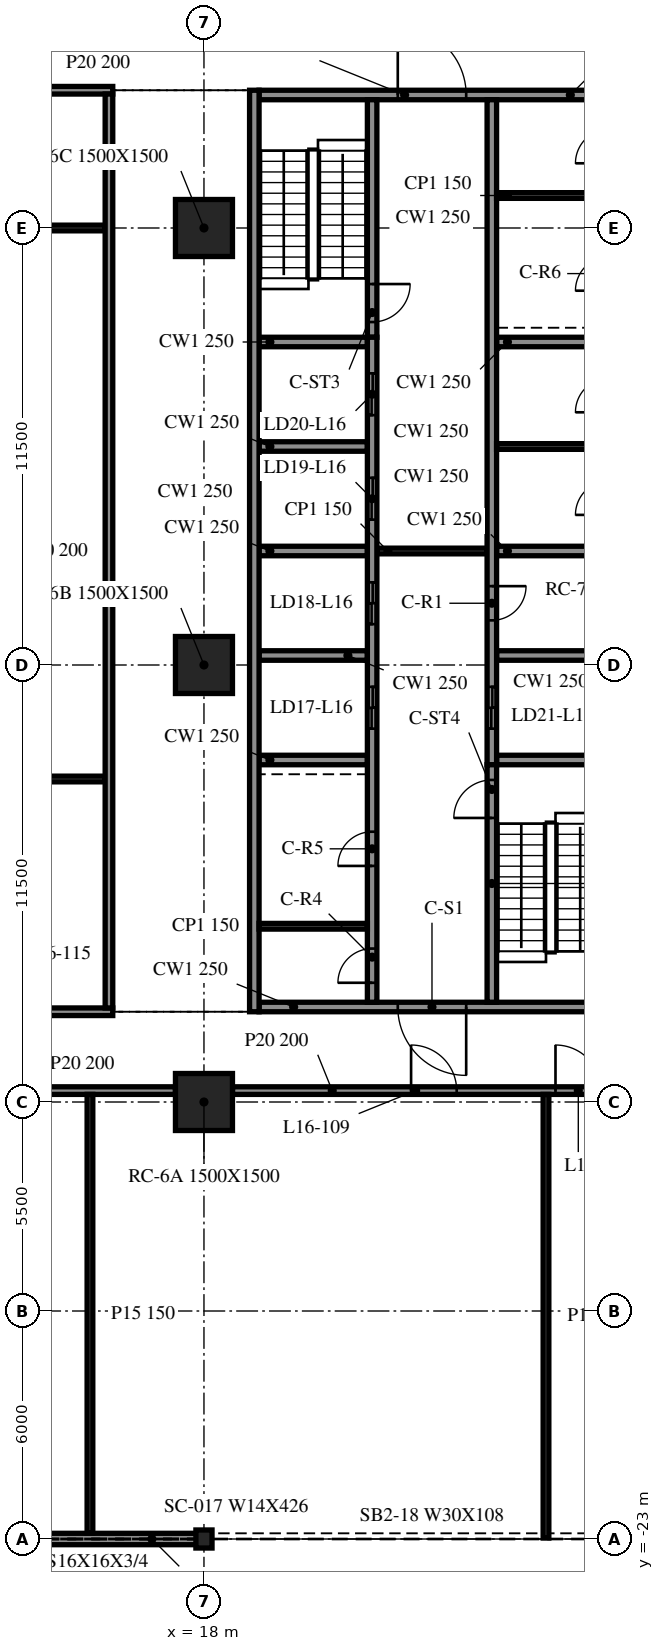
"""IFC4 building model, lengths in metres.
Left out: names, types, materials, properties, quantities, classifications, styles, units other than length and angle.
Written with IfcOpenShell. Run it as: python <this file> out.ifc"""

import sys

from ifc_helpers import new_model, si_unit, direction, frame, frame_2d, origin, origin_2d, place, context, subcontext, project, spatial, rectangle, i_section, extrude, element, fill, save


model = new_model("IFC4")
c1 = context("Model", 3, precision=1e-05, world=origin(), true_north=direction((0.0, 1.0)))
c2 = subcontext(c1, "Body", "Model", "MODEL_VIEW")
j1 = project(units=[si_unit("LENGTHUNIT", "METRE"), si_unit("PLANEANGLEUNIT", "RADIAN")], contexts=[c1])
p1 = place(None, origin())
s1 = spatial("IfcSite", under=j1, at=p1, CompositionType="ELEMENT")
p2 = place(p1, origin())
s2 = spatial("IfcBuilding", under=s1, at=p2, CompositionType="ELEMENT")
p3 = place(p2, frame((0.0, 0.0, 71.8)))
s3 = spatial("IfcBuildingStorey", under=s2, at=p3, CompositionType="ELEMENT", Elevation=71.8)
for number, where, z_axis, x_axis in (
    (1, (18.0, -11.5, -0.34), (0.0, 0.0, 1.0), (1.0, 0.0, 0.0)),
    (2, (18.0, 0.0, -0.34), (0.0, 0.0, 1.0), (1.0, 0.0, 0.0)),
    (3, (18.0, 11.5, -0.34), (0.0, 0.0, 1.0), (1.0, 0.0, 0.0)),
):
    element("IfcColumn", number, at=place(p3, frame(where, z_axis=z_axis, x_axis=x_axis)), inside=s3, PredefinedType="COLUMN", context=c2, shape_type="SweptSolid", body=[
        extrude(rectangle(XDim=1.5, YDim=1.5, at=origin_2d()), origin(), (0.0, 0.0, 1.0), 4.3),
    ])
p4 = place(p3, frame((18.0, -23.0, -0.34), z_axis=(0.0, 0.0, 1.0), x_axis=(1.0, 0.0, 0.0)))
e4 = element("IfcColumn", 4, at=p4, inside=s3, PredefinedType="COLUMN", context=c2, shape_type="SweptSolid", body=[
    extrude(i_section(OverallWidth=0.424, OverallDepth=0.475, WebThickness=0.048, FlangeThickness=0.077, at=origin_2d()), origin(), (0.0, 0.0, 1.0), 4.3),
])
p5 = place(p3, frame((6.024, -23.0, 0.0), z_axis=(0.0, 0.0, 1.0), x_axis=(1.0, 0.0, 0.0)))
e5 = element("IfcWall", 5, at=p5, inside=s3, PredefinedType="NOTDEFINED", context=c2, shape_type="SweptSolid", body=[
    extrude(rectangle(XDim=11.952, YDim=0.3, at=frame_2d((5.976, 0.0))), origin(), (0.0, 0.0, 1.0), 3.203),
])
p6 = place(p3, frame((19.325, 15.125, 0.0), z_axis=(0.0, 0.0, 1.0), x_axis=(0.0, -1.0, 0.0)))
e6 = element("IfcWall", 6, at=p6, inside=s3, PredefinedType="SOLIDWALL", context=c2, shape_type="SweptSolid", body=[
    extrude(rectangle(XDim=24.25, YDim=0.25, at=frame_2d((12.125, 0.0))), origin(), (0.0, 0.0, 1.0), 3.96),
])
p7 = place(p3, frame((28.55, -9.0, 0.0), z_axis=(0.0, 0.0, 1.0), x_axis=(-1.0, 0.0, 0.0)))
e7 = element("IfcWall", 7, at=p7, inside=s3, PredefinedType="SOLIDWALL", context=c2, shape_type="SweptSolid", body=[
    extrude(rectangle(XDim=9.1, YDim=0.25, at=frame_2d((4.55, 0.0))), origin(), (0.0, 0.0, 1.0), 3.96),
])
p8 = place(p7, frame((3.65, 0.0, 0.0)))
e8 = element("IfcOpeningElement", 8, at=p8, cuts=e7, PredefinedType="OPENING", context=c2, shape_type="SweptSolid", body=[
    extrude(rectangle(XDim=1.8, YDim=2.1, at=frame_2d((0.9, 1.05))), frame((0.0, 0.135, 0.0), z_axis=(0.0, -1.0, 0.0), x_axis=(1.0, 0.0, 0.0)), (0.0, 0.0, 1.0), 0.27),
])
p9 = place(p3, frame((19.45, 15.0, 0.0), z_axis=(0.0, 0.0, 1.0), x_axis=(1.0, 0.0, 0.0)))
e9 = element("IfcWall", 9, at=p9, inside=s3, PredefinedType="SOLIDWALL", context=c2, shape_type="SweptSolid", body=[
    extrude(rectangle(XDim=9.1, YDim=0.25, at=frame_2d((4.55, 0.0))), origin(), (0.0, 0.0, 1.0), 3.96),
])
p10 = place(p9, frame((3.65, 0.0, 0.0)))
e10 = element("IfcOpeningElement", 10, at=p10, cuts=e9, PredefinedType="OPENING", context=c2, shape_type="SweptSolid", body=[
    extrude(rectangle(XDim=1.8, YDim=2.1, at=frame_2d((0.9, 1.05))), frame((0.0, 0.135, 0.0), z_axis=(0.0, -1.0, 0.0), x_axis=(1.0, 0.0, 0.0)), (0.0, 0.0, 1.0), 0.27),
])
p11 = place(p3, frame((22.425, -8.875, 0.0), z_axis=(0.0, 0.0, 1.0), x_axis=(0.0, 1.0, 0.0)))
e11 = element("IfcWall", 11, at=p11, inside=s3, PredefinedType="SOLIDWALL", context=c2, shape_type="SweptSolid", body=[
    extrude(rectangle(XDim=17.5, YDim=0.25, at=frame_2d((8.75, 0.0))), origin(), (0.0, 0.0, 1.0), 3.96),
])
p12 = place(p11, frame((7.2, 0.0, 0.0)))
e12 = element("IfcOpeningElement", 12, at=p12, cuts=e11, PredefinedType="OPENING", context=c2, shape_type="SweptSolid", body=[
    extrude(rectangle(XDim=1.1, YDim=2.1, at=frame_2d((0.55, 1.05))), frame((0.0, 0.135, 0.0), z_axis=(0.0, -1.0, 0.0), x_axis=(1.0, 0.0, 0.0)), (0.0, 0.0, 1.0), 0.27),
])
p13 = place(p11, frame((9.95, 0.0, 0.0)))
e13 = element("IfcOpeningElement", 13, at=p13, cuts=e11, PredefinedType="OPENING", context=c2, shape_type="SweptSolid", body=[
    extrude(rectangle(XDim=1.1, YDim=2.1, at=frame_2d((0.55, 1.05))), frame((0.0, 0.135, 0.0), z_axis=(0.0, -1.0, 0.0), x_axis=(1.0, 0.0, 0.0)), (0.0, 0.0, 1.0), 0.27),
])
p14 = place(p11, frame((12.7, 0.0, 0.0)))
e14 = element("IfcOpeningElement", 14, at=p14, cuts=e11, PredefinedType="OPENING", context=c2, shape_type="SweptSolid", body=[
    extrude(rectangle(XDim=1.1, YDim=2.1, at=frame_2d((0.55, 1.05))), frame((0.0, 0.135, 0.0), z_axis=(0.0, -1.0, 0.0), x_axis=(1.0, 0.0, 0.0)), (0.0, 0.0, 1.0), 0.27),
])
p15 = place(p11, frame((15.45, 0.0, 0.0)))
e15 = element("IfcOpeningElement", 15, at=p15, cuts=e11, PredefinedType="OPENING", context=c2, shape_type="SweptSolid", body=[
    extrude(rectangle(XDim=1.1, YDim=2.1, at=frame_2d((0.55, 1.05))), frame((0.0, 0.135, 0.0), z_axis=(0.0, -1.0, 0.0), x_axis=(1.0, 0.0, 0.0)), (0.0, 0.0, 1.0), 0.27),
])
p16 = place(p11, frame((0.512, 0.0, 0.0)))
e16 = element("IfcOpeningElement", 16, at=p16, cuts=e11, PredefinedType="OPENING", context=c2, shape_type="SweptSolid", body=[
    extrude(rectangle(XDim=0.9, YDim=2.1, at=frame_2d((0.45, 1.05))), frame((0.0, 0.135, 0.0), z_axis=(0.0, -1.0, 0.0), x_axis=(1.0, 0.0, 0.0)), (0.0, 0.0, 1.0), 0.27),
])
p17 = place(p11, frame((3.587, 0.0, 0.0)))
e17 = element("IfcOpeningElement", 17, at=p17, cuts=e11, PredefinedType="OPENING", context=c2, shape_type="SweptSolid", body=[
    extrude(rectangle(XDim=0.9, YDim=2.1, at=frame_2d((0.45, 1.05))), frame((0.0, 0.135, 0.0), z_axis=(0.0, -1.0, 0.0), x_axis=(1.0, 0.0, 0.0)), (0.0, 0.0, 1.0), 0.27),
])
p18 = place(p3, frame((22.425, 14.875, 0.0), z_axis=(0.0, 0.0, 1.0), x_axis=(0.0, -1.0, 0.0)))
e18 = element("IfcWall", 18, at=p18, inside=s3, PredefinedType="SOLIDWALL", context=c2, shape_type="SweptSolid", body=[
    extrude(rectangle(XDim=6.25, YDim=0.25, at=frame_2d((3.125, 0.0))), origin(), (0.0, 0.0, 1.0), 3.96),
])
p19 = place(p18, frame((4.85, 0.0, 0.0)))
e19 = element("IfcOpeningElement", 19, at=p19, cuts=e18, PredefinedType="OPENING", context=c2, shape_type="SweptSolid", body=[
    extrude(rectangle(XDim=1.0, YDim=2.1, at=frame_2d((0.5, 1.05))), frame((0.0, 0.135, 0.0), z_axis=(0.0, -1.0, 0.0), x_axis=(1.0, 0.0, 0.0)), (0.0, 0.0, 1.0), 0.27),
])
p20 = place(p3, frame((25.575, -8.875, 0.0), z_axis=(0.0, 0.0, 1.0), x_axis=(0.0, 1.0, 0.0)))
e20 = element("IfcWall", 20, at=p20, inside=s3, PredefinedType="SOLIDWALL", context=c2, shape_type="SweptSolid", body=[
    extrude(rectangle(XDim=6.25, YDim=0.25, at=frame_2d((3.125, 0.0))), origin(), (0.0, 0.0, 1.0), 3.96),
])
p21 = place(p20, frame((4.85, 0.0, 0.0)))
e21 = element("IfcOpeningElement", 21, at=p21, cuts=e20, PredefinedType="OPENING", context=c2, shape_type="SweptSolid", body=[
    extrude(rectangle(XDim=1.0, YDim=2.1, at=frame_2d((0.5, 1.05))), frame((0.0, 0.135, 0.0), z_axis=(0.0, -1.0, 0.0), x_axis=(1.0, 0.0, 0.0)), (0.0, 0.0, 1.0), 0.27),
])
p22 = place(p3, frame((25.575, 14.875, 0.0), z_axis=(0.0, 0.0, 1.0), x_axis=(0.0, -1.0, 0.0)))
e22 = element("IfcWall", 22, at=p22, inside=s3, PredefinedType="SOLIDWALL", context=c2, shape_type="SweptSolid", body=[
    extrude(rectangle(XDim=17.5, YDim=0.25, at=frame_2d((8.75, 0.0))), origin(), (0.0, 0.0, 1.0), 3.96),
])
p23 = place(p22, frame((15.45, 0.0, 0.0)))
e23 = element("IfcOpeningElement", 23, at=p23, cuts=e22, PredefinedType="OPENING", context=c2, shape_type="SweptSolid", body=[
    extrude(rectangle(XDim=1.1, YDim=2.1, at=frame_2d((0.55, 1.05))), frame((0.0, 0.135, 0.0), z_axis=(0.0, -1.0, 0.0), x_axis=(1.0, 0.0, 0.0)), (0.0, 0.0, 1.0), 0.27),
])
p24 = place(p22, frame((12.8, 0.0, 0.0)))
e24 = element("IfcOpeningElement", 24, at=p24, cuts=e22, PredefinedType="OPENING", context=c2, shape_type="SweptSolid", body=[
    extrude(rectangle(XDim=0.9, YDim=2.1, at=frame_2d((0.45, 1.05))), frame((0.0, 0.135, 0.0), z_axis=(0.0, -1.0, 0.0), x_axis=(1.0, 0.0, 0.0)), (0.0, 0.0, 1.0), 0.27),
])
for number, where, z_axis, x_axis in (
    (25, (19.45, -2.5, 0.0), (0.0, 0.0, 1.0), (1.0, 0.0, 0.0)),
    (26, (19.45, 0.25, 0.0), (0.0, 0.0, 1.0), (1.0, 0.0, 0.0)),
    (27, (19.45, 3.0, 0.0), (0.0, 0.0, 1.0), (1.0, 0.0, 0.0)),
    (28, (19.45, 5.75, 0.0), (0.0, 0.0, 1.0), (1.0, 0.0, 0.0)),
    (29, (19.45, 8.5, 0.0), (0.0, 0.0, 1.0), (1.0, 0.0, 0.0)),
    (30, (25.7, -2.5, 0.0), (0.0, 0.0, 1.0), (1.0, 0.0, 0.0)),
    (31, (25.7, 0.25, 0.0), (0.0, 0.0, 1.0), (1.0, 0.0, 0.0)),
    (32, (25.7, 3.0, 0.0), (0.0, 0.0, 1.0), (1.0, 0.0, 0.0)),
    (33, (25.7, 8.5, 0.0), (0.0, 0.0, 1.0), (1.0, 0.0, 0.0)),
):
    element("IfcWall", number, at=place(p3, frame(where, z_axis=z_axis, x_axis=x_axis)), inside=s3, PredefinedType="SOLIDWALL", context=c2, shape_type="SweptSolid", body=[
        extrude(rectangle(XDim=2.85, YDim=0.25, at=frame_2d((1.425, 0.0))), origin(), (0.0, 0.0, 1.0), 3.96),
    ])
p25 = place(p3, frame((22.55, 3.0, 0.0), z_axis=(0.0, 0.0, 1.0), x_axis=(1.0, 0.0, 0.0)))
e34 = element("IfcWall", 34, at=p25, inside=s3, PredefinedType="PARTITIONING", context=c2, shape_type="SweptSolid", body=[
    extrude(rectangle(XDim=2.9, YDim=0.15, at=frame_2d((1.45, 0.0))), origin(), (0.0, 0.0, 1.0), 3.96),
])
for number, where, z_axis, x_axis in (
    (35, (25.7, 5.75, 0.0), (0.0, 0.0, 1.0), (1.0, 0.0, 0.0)),
    (36, (19.45, -6.875, 0.0), (0.0, 0.0, 1.0), (1.0, 0.0, 0.0)),
    (37, (25.7, 12.355, 0.0), (0.0, 0.0, 1.0), (1.0, 0.0, 0.0)),
):
    element("IfcWall", number, at=place(p3, frame(where, z_axis=z_axis, x_axis=x_axis)), inside=s3, PredefinedType="PARTITIONING", context=c2, shape_type="SweptSolid", body=[
        extrude(rectangle(XDim=2.85, YDim=0.15, at=frame_2d((1.425, 0.0))), origin(), (0.0, 0.0, 1.0), 3.96),
    ])
p26 = place(p3, frame((6.75, -11.2, 0.0), z_axis=(0.0, 0.0, 1.0), x_axis=(1.0, 0.0, 0.0)))
e38 = element("IfcWall", 38, at=p26, inside=s3, PredefinedType="PARTITIONING", context=c2, shape_type="SweptSolid", body=[
    extrude(rectangle(XDim=10.5, YDim=0.2, at=frame_2d((5.25, 0.0))), origin(), (0.0, 0.0, 1.0), 3.96),
])
p27 = place(p26, frame((4.7, 0.0, 0.0)))
e39 = element("IfcOpeningElement", 39, at=p27, cuts=e38, PredefinedType="OPENING", context=c2, shape_type="SweptSolid", body=[
    extrude(rectangle(XDim=1.0, YDim=2.1, at=frame_2d((0.5, 1.05))), frame((0.0, 0.11, 0.0), z_axis=(0.0, -1.0, 0.0), x_axis=(1.0, 0.0, 0.0)), (0.0, 0.0, 1.0), 0.22),
])
p28 = place(p3, frame((18.75, -11.2, 0.0), z_axis=(0.0, 0.0, 1.0), x_axis=(1.0, 0.0, 0.0)))
e40 = element("IfcWall", 40, at=p28, inside=s3, PredefinedType="PARTITIONING", context=c2, shape_type="SweptSolid", body=[
    extrude(rectangle(XDim=10.5, YDim=0.2, at=frame_2d((5.25, 0.0))), origin(), (0.0, 0.0, 1.0), 3.96),
])
p29 = place(p28, frame((4.7, 0.0, 0.0)))
e41 = element("IfcOpeningElement", 41, at=p29, cuts=e40, PredefinedType="OPENING", context=c2, shape_type="SweptSolid", body=[
    extrude(rectangle(XDim=1.2, YDim=2.1, at=frame_2d((0.6, 1.05))), frame((0.0, 0.11, 0.0), z_axis=(0.0, -1.0, 0.0), x_axis=(1.0, 0.0, 0.0)), (0.0, 0.0, 1.0), 0.22),
])
p30 = place(p28, frame((8.5, 0.0, 0.0)))
e42 = element("IfcOpeningElement", 42, at=p30, cuts=e40, PredefinedType="OPENING", context=c2, shape_type="SweptSolid", body=[
    extrude(rectangle(XDim=1.2, YDim=2.1, at=frame_2d((0.6, 1.05))), frame((0.0, 0.11, 0.0), z_axis=(0.0, -1.0, 0.0), x_axis=(1.0, 0.0, 0.0)), (0.0, 0.0, 1.0), 0.22),
])
p31 = place(p3, frame((8.3, -9.125, 0.0), z_axis=(0.0, 0.0, 1.0), x_axis=(1.0, 0.0, 0.0)))
e43 = element("IfcWall", 43, at=p31, inside=s3, PredefinedType="PARTITIONING", context=c2, shape_type="SweptSolid", body=[
    extrude(rectangle(XDim=7.3, YDim=0.2, at=frame_2d((3.65, 0.0))), origin(), (0.0, 0.0, 1.0), 3.96),
])
p32 = place(p31, frame((3.1, 0.0, 0.0)))
e44 = element("IfcOpeningElement", 44, at=p32, cuts=e43, PredefinedType="OPENING", context=c2, shape_type="SweptSolid", body=[
    extrude(rectangle(XDim=1.0, YDim=2.1, at=frame_2d((0.5, 1.05))), frame((0.0, 0.11, 0.0), z_axis=(0.0, -1.0, 0.0), x_axis=(1.0, 0.0, 0.0)), (0.0, 0.0, 1.0), 0.22),
])
for number, where, z_axis, x_axis in (
    (45, (8.5, -3.0, 0.0), (0.0, 0.0, 1.0), (1.0, 0.0, 0.0)),
    (46, (8.5, 11.5, 0.0), (0.0, 0.0, 1.0), (1.0, 0.0, 0.0)),
):
    element("IfcWall", number, at=place(p3, frame(where, z_axis=z_axis, x_axis=x_axis)), inside=s3, PredefinedType="PARTITIONING", context=c2, shape_type="SweptSolid", body=[
        extrude(rectangle(XDim=6.9, YDim=0.15, at=frame_2d((3.45, 0.0))), origin(), (0.0, 0.0, 1.0), 3.96),
    ])
p33 = place(p3, frame((8.3, 15.125, 0.0), z_axis=(0.0, 0.0, 1.0), x_axis=(1.0, 0.0, 0.0)))
e47 = element("IfcWall", 47, at=p33, inside=s3, PredefinedType="PARTITIONING", context=c2, shape_type="SweptSolid", body=[
    extrude(rectangle(XDim=7.3, YDim=0.2, at=frame_2d((3.65, 0.0))), origin(), (0.0, 0.0, 1.0), 3.96),
])
p34 = place(p33, frame((3.1, 0.0, 0.0)))
e48 = element("IfcOpeningElement", 48, at=p34, cuts=e47, PredefinedType="OPENING", context=c2, shape_type="SweptSolid", body=[
    extrude(rectangle(XDim=1.0, YDim=2.1, at=frame_2d((0.5, 1.05))), frame((0.0, 0.11, 0.0), z_axis=(0.0, -1.0, 0.0), x_axis=(1.0, 0.0, 0.0)), (0.0, 0.0, 1.0), 0.22),
])
p35 = place(p3, frame((15.0, -22.85, 0.0), z_axis=(0.0, 0.0, 1.0), x_axis=(0.0, 1.0, 0.0)))
e49 = element("IfcWall", 49, at=p35, inside=s3, PredefinedType="PARTITIONING", context=c2, shape_type="SweptSolid", body=[
    extrude(rectangle(XDim=11.55, YDim=0.15, at=frame_2d((5.775, 0.0))), origin(), (0.0, 0.0, 1.0), 3.96),
])
p36 = place(p3, frame((15.5, -9.025, 0.0), z_axis=(0.0, 0.0, 1.0), x_axis=(0.0, 1.0, 0.0)))
e50 = element("IfcWall", 50, at=p36, inside=s3, PredefinedType="PARTITIONING", context=c2, shape_type="SweptSolid", body=[
    extrude(rectangle(XDim=24.05, YDim=0.2, at=frame_2d((12.025, 0.0))), origin(), (0.0, 0.0, 1.0), 3.96),
])
p37 = place(p3, frame((27.0, -22.975, 0.0), z_axis=(0.0, 0.0, 1.0), x_axis=(0.0, 1.0, 0.0)))
e51 = element("IfcWall", 51, at=p37, inside=s3, PredefinedType="PARTITIONING", context=c2, shape_type="SweptSolid", body=[
    extrude(rectangle(XDim=11.675, YDim=0.15, at=frame_2d((5.837, 0.0))), origin(), (0.0, 0.0, 1.0), 3.96),
])
p38 = place(p8, origin())
e52 = element("IfcDoor", 52, at=p38, inside=s3, OperationType="DOUBLE_DOOR_SINGLE_SWING", PredefinedType="DOOR", context=c2, shape_type="SweptSolid", body=[
    extrude(rectangle(XDim=1.8, YDim=2.1, at=frame_2d((0.9, 1.05))), frame((0.0, 0.025, 0.0), z_axis=(0.0, -1.0, 0.0), x_axis=(1.0, 0.0, 0.0)), (0.0, 0.0, 1.0), 0.05),
])
fill(e8, e52)
p39 = place(p10, origin())
e53 = element("IfcDoor", 53, at=p39, inside=s3, OperationType="DOUBLE_DOOR_SINGLE_SWING", PredefinedType="DOOR", context=c2, shape_type="SweptSolid", body=[
    extrude(rectangle(XDim=1.8, YDim=2.1, at=frame_2d((0.9, 1.05))), frame((0.0, 0.025, 0.0), z_axis=(0.0, -1.0, 0.0), x_axis=(1.0, 0.0, 0.0)), (0.0, 0.0, 1.0), 0.05),
])
fill(e10, e53)
p40 = place(p23, origin())
e54 = element("IfcDoor", 54, at=p40, inside=s3, OperationType="DOUBLE_DOOR_SLIDING", PredefinedType="DOOR", context=c2, shape_type="SweptSolid", body=[
    extrude(rectangle(XDim=1.1, YDim=2.1, at=frame_2d((0.55, 1.05))), frame((0.0, 0.025, 0.0), z_axis=(0.0, -1.0, 0.0), x_axis=(1.0, 0.0, 0.0)), (0.0, 0.0, 1.0), 0.05),
])
fill(e23, e54)
p41 = place(p12, origin())
e55 = element("IfcDoor", 55, at=p41, inside=s3, OperationType="DOUBLE_DOOR_SLIDING", PredefinedType="DOOR", context=c2, shape_type="SweptSolid", body=[
    extrude(rectangle(XDim=1.1, YDim=2.1, at=frame_2d((0.55, 1.05))), frame((0.0, 0.025, 0.0), z_axis=(0.0, -1.0, 0.0), x_axis=(1.0, 0.0, 0.0)), (0.0, 0.0, 1.0), 0.05),
])
fill(e12, e55)
p42 = place(p13, origin())
e56 = element("IfcDoor", 56, at=p42, inside=s3, OperationType="DOUBLE_DOOR_SLIDING", PredefinedType="DOOR", context=c2, shape_type="SweptSolid", body=[
    extrude(rectangle(XDim=1.1, YDim=2.1, at=frame_2d((0.55, 1.05))), frame((0.0, 0.025, 0.0), z_axis=(0.0, -1.0, 0.0), x_axis=(1.0, 0.0, 0.0)), (0.0, 0.0, 1.0), 0.05),
])
fill(e13, e56)
p43 = place(p14, origin())
e57 = element("IfcDoor", 57, at=p43, inside=s3, OperationType="DOUBLE_DOOR_SLIDING", PredefinedType="DOOR", context=c2, shape_type="SweptSolid", body=[
    extrude(rectangle(XDim=1.1, YDim=2.1, at=frame_2d((0.55, 1.05))), frame((0.0, 0.025, 0.0), z_axis=(0.0, -1.0, 0.0), x_axis=(1.0, 0.0, 0.0)), (0.0, 0.0, 1.0), 0.05),
])
fill(e14, e57)
p44 = place(p15, origin())
e58 = element("IfcDoor", 58, at=p44, inside=s3, OperationType="DOUBLE_DOOR_SLIDING", PredefinedType="DOOR", context=c2, shape_type="SweptSolid", body=[
    extrude(rectangle(XDim=1.1, YDim=2.1, at=frame_2d((0.55, 1.05))), frame((0.0, 0.025, 0.0), z_axis=(0.0, -1.0, 0.0), x_axis=(1.0, 0.0, 0.0)), (0.0, 0.0, 1.0), 0.05),
])
fill(e15, e58)
p45 = place(p24, origin())
e59 = element("IfcDoor", 59, at=p45, inside=s3, OperationType="SINGLE_SWING_LEFT", PredefinedType="DOOR", context=c2, shape_type="SweptSolid", body=[
    extrude(rectangle(XDim=0.9, YDim=2.1, at=frame_2d((0.45, 1.05))), frame((0.0, 0.025, 0.0), z_axis=(0.0, -1.0, 0.0), x_axis=(1.0, 0.0, 0.0)), (0.0, 0.0, 1.0), 0.05),
])
fill(e24, e59)
p46 = place(p16, origin())
e60 = element("IfcDoor", 60, at=p46, inside=s3, OperationType="SINGLE_SWING_RIGHT", PredefinedType="DOOR", context=c2, shape_type="SweptSolid", body=[
    extrude(rectangle(XDim=0.9, YDim=2.1, at=frame_2d((0.45, 1.05))), frame((0.0, 0.025, 0.0), z_axis=(0.0, -1.0, 0.0), x_axis=(1.0, 0.0, 0.0)), (0.0, 0.0, 1.0), 0.05),
])
fill(e16, e60)
p47 = place(p17, origin())
e61 = element("IfcDoor", 61, at=p47, inside=s3, OperationType="SINGLE_SWING_LEFT", PredefinedType="DOOR", context=c2, shape_type="SweptSolid", body=[
    extrude(rectangle(XDim=0.9, YDim=2.1, at=frame_2d((0.45, 1.05))), frame((0.0, 0.025, 0.0), z_axis=(0.0, -1.0, 0.0), x_axis=(1.0, 0.0, 0.0)), (0.0, 0.0, 1.0), 0.05),
])
fill(e17, e61)
p48 = place(p19, origin())
e62 = element("IfcDoor", 62, at=p48, inside=s3, OperationType="SINGLE_SWING_RIGHT", PredefinedType="DOOR", context=c2, shape_type="SweptSolid", body=[
    extrude(rectangle(XDim=1.0, YDim=2.1, at=frame_2d((0.5, 1.05))), frame((0.0, 0.025, 0.0), z_axis=(0.0, -1.0, 0.0), x_axis=(1.0, 0.0, 0.0)), (0.0, 0.0, 1.0), 0.05),
])
fill(e19, e62)
p49 = place(p21, origin())
e63 = element("IfcDoor", 63, at=p49, inside=s3, OperationType="SINGLE_SWING_LEFT", PredefinedType="DOOR", context=c2, shape_type="SweptSolid", body=[
    extrude(rectangle(XDim=1.0, YDim=2.1, at=frame_2d((0.5, 1.05))), frame((0.0, 0.025, 0.0), z_axis=(0.0, -1.0, 0.0), x_axis=(1.0, 0.0, 0.0)), (0.0, 0.0, 1.0), 0.05),
])
fill(e21, e63)
p50 = place(p29, origin())
e64 = element("IfcDoor", 64, at=p50, inside=s3, OperationType="SINGLE_SWING_LEFT", PredefinedType="DOOR", context=c2, shape_type="SweptSolid", body=[
    extrude(rectangle(XDim=1.2, YDim=2.1, at=frame_2d((0.6, 1.05))), frame((0.0, 0.025, 0.0), z_axis=(0.0, -1.0, 0.0), x_axis=(1.0, 0.0, 0.0)), (0.0, 0.0, 1.0), 0.05),
])
fill(e41, e64)
p51 = place(p30, origin())
e65 = element("IfcDoor", 65, at=p51, inside=s3, OperationType="SINGLE_SWING_LEFT", PredefinedType="DOOR", context=c2, shape_type="SweptSolid", body=[
    extrude(rectangle(XDim=1.2, YDim=2.1, at=frame_2d((0.6, 1.05))), frame((0.0, 0.025, 0.0), z_axis=(0.0, -1.0, 0.0), x_axis=(1.0, 0.0, 0.0)), (0.0, 0.0, 1.0), 0.05),
])
fill(e42, e65)
save(model, sys.argv[1])
